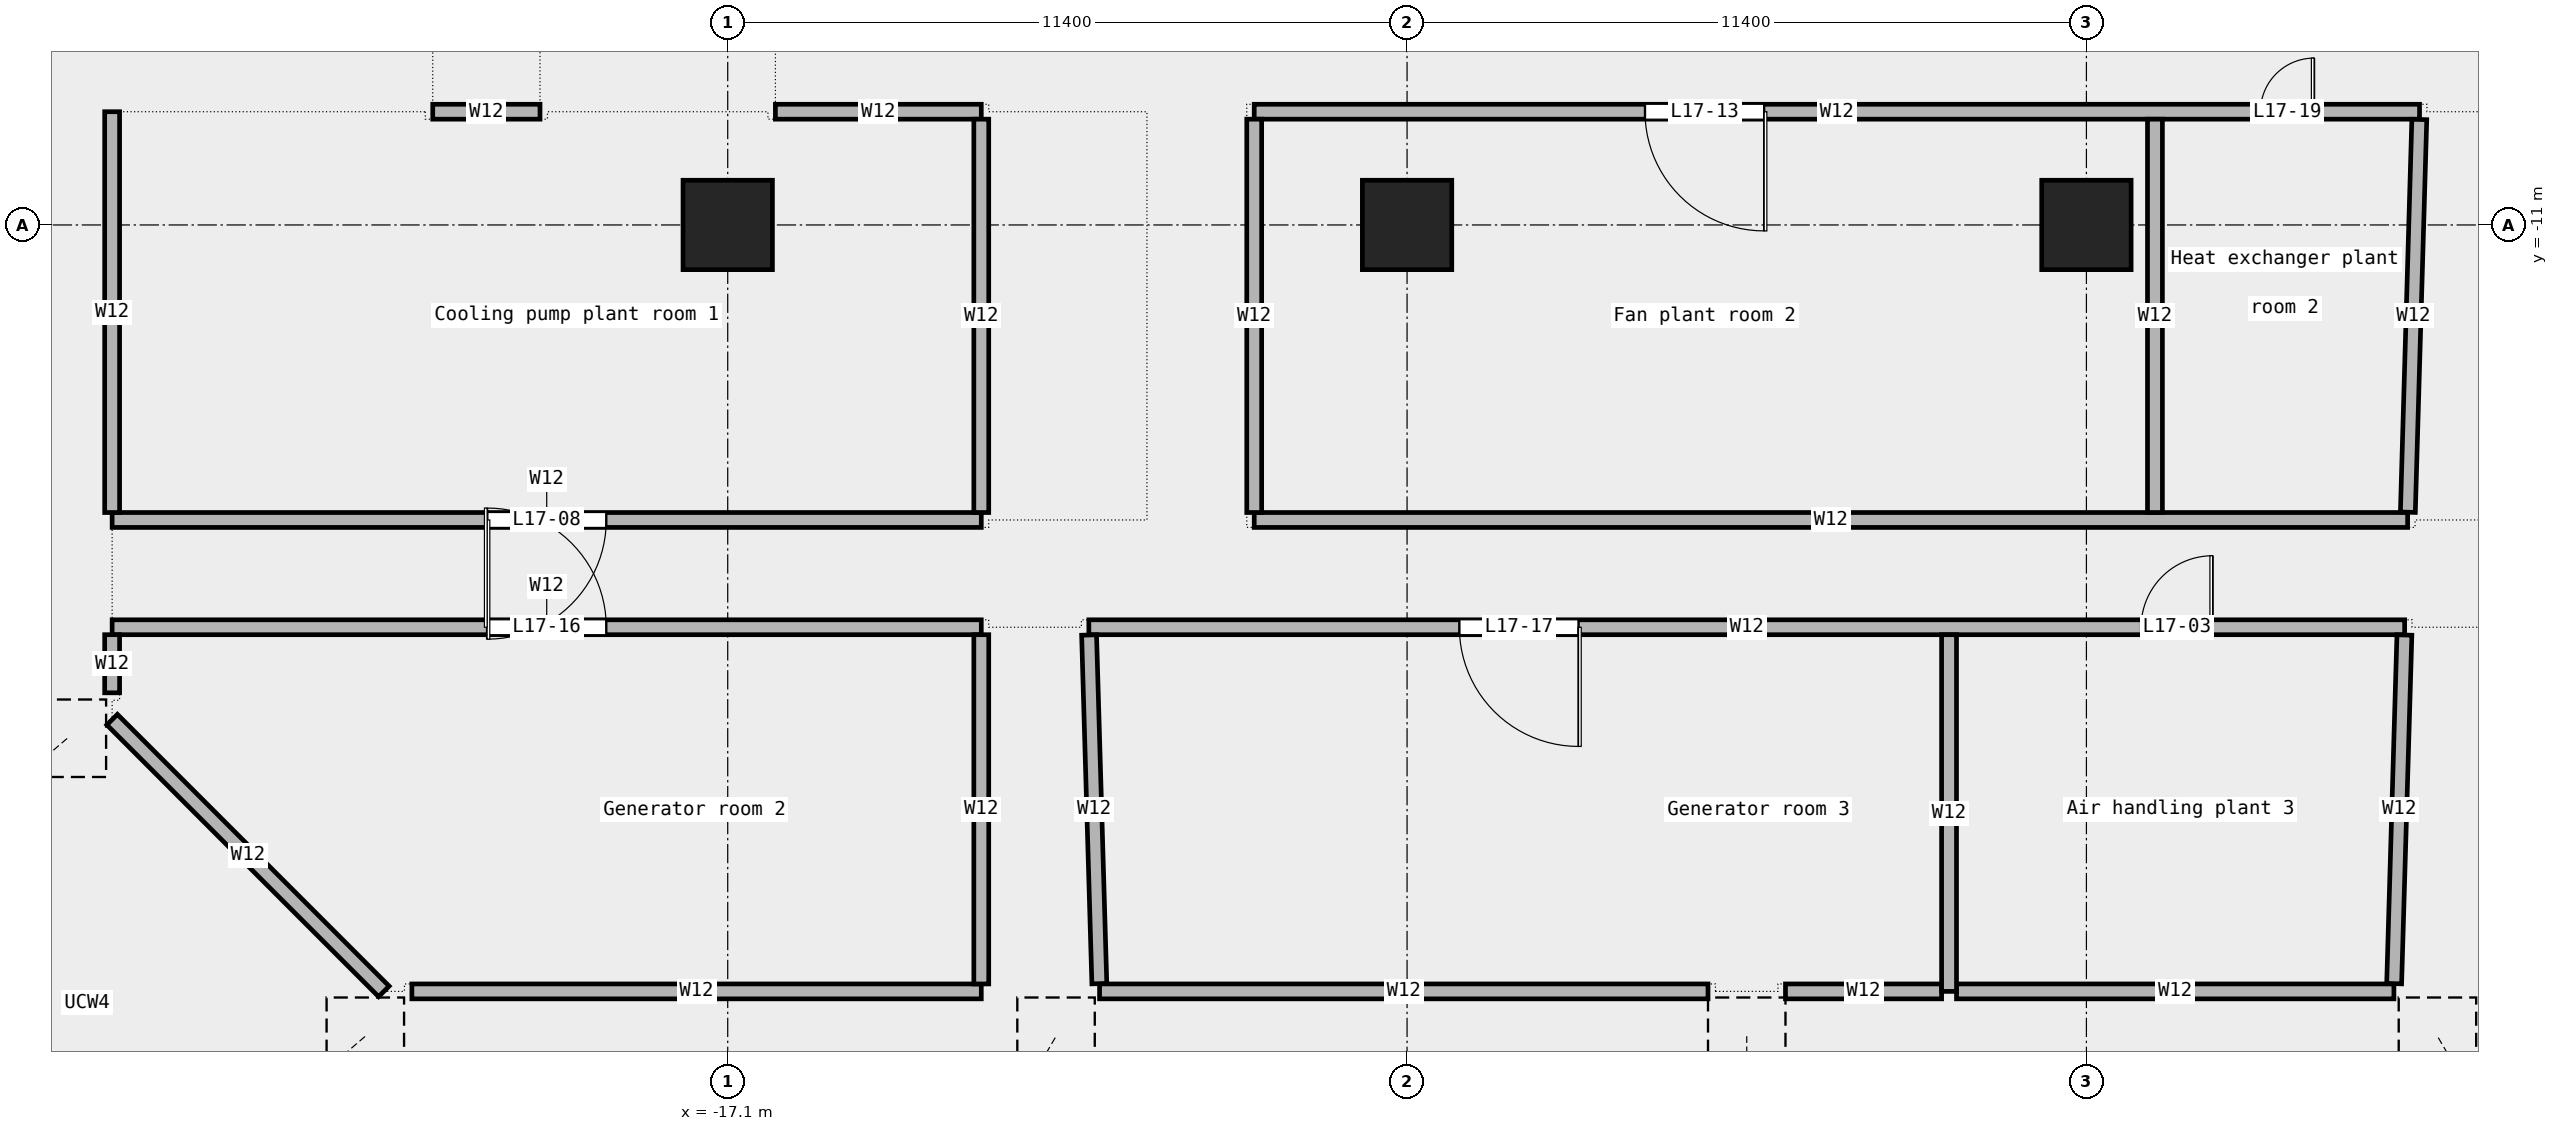
"""IFC4 building model, lengths in metres.
Left out: names, types, materials, properties, quantities, classifications, styles, units other than length and angle.
Written with IfcOpenShell. Run it as: python <this file> out.ifc"""

import sys

from ifc_helpers import new_model, si_unit, direction, frame, frame_2d, origin, origin_2d, place, context, subcontext, project, spatial, rectangle, extrude, element, fill, save


model = new_model("IFC4")
c1 = context("Model", 3, precision=1e-05, world=origin(), true_north=direction((0.0, 1.0)))
c2 = subcontext(c1, "Body", "Model", "MODEL_VIEW")
j1 = project(units=[si_unit("LENGTHUNIT", "METRE"), si_unit("PLANEANGLEUNIT", "RADIAN")], contexts=[c1])
p1 = place(None, origin())
s1 = spatial("IfcSite", under=j1, at=p1, CompositionType="ELEMENT")
p2 = place(p1, origin())
s2 = spatial("IfcBuilding", under=s1, at=p2, CompositionType="ELEMENT")
p3 = place(p2, frame((0.0, 0.0, 88.6)))
s3 = spatial("IfcBuildingStorey", under=s2, at=p3, CompositionType="ELEMENT", Elevation=88.6)
p4 = place(p3, frame((-24.8, -26.0, 0.0), z_axis=(0.272262107714, 0.233373387351, 0.933493549404), x_axis=(-0.650800804228, 0.759248518745, 0.0)))
e1 = element("IfcColumn", 1, at=p4, inside=s3, PredefinedType="COLUMN", context=c2, shape_type="SweptSolid", body=[
    extrude(rectangle(XDim=1.3, YDim=1.3, at=origin_2d()), origin(), (0.0, 0.0, 1.0), 5.945),
])
p5 = place(p3, frame((-12.4, -26.0, 0.0), z_axis=(0.140080623394, 0.240144248189, 0.960576992756), x_axis=(-0.863784413599, 0.503861575062, 0.0)))
e2 = element("IfcColumn", 2, at=p5, inside=s3, PredefinedType="COLUMN", context=c2, shape_type="SweptSolid", body=[
    extrude(rectangle(XDim=1.3, YDim=1.3, at=origin_2d()), origin(), (0.0, 0.0, 1.0), 5.778),
])
p6 = place(p3, frame((0.0, -26.0, 0.0), z_axis=(0.0, 0.242535625036, 0.970142500145), x_axis=(-1.0, 0.0, 0.0)))
e3 = element("IfcColumn", 3, at=p6, inside=s3, PredefinedType="COLUMN", context=c2, shape_type="SweptSolid", body=[
    extrude(rectangle(XDim=1.3, YDim=1.3, at=origin_2d()), origin(), (0.0, 0.0, 1.0), 5.721),
])
p7 = place(p3, frame((12.4, -26.0, 0.0), z_axis=(-0.140080623394, 0.240144248189, 0.960576992756), x_axis=(-0.863784413599, -0.503861575062, 0.0)))
e4 = element("IfcColumn", 4, at=p7, inside=s3, PredefinedType="COLUMN", context=c2, shape_type="SweptSolid", body=[
    extrude(rectangle(XDim=1.3, YDim=1.3, at=origin_2d()), origin(), (0.0, 0.0, 1.0), 5.778),
])
p8 = place(p3, frame((-29.8, -21.0, 0.0), z_axis=(0.272262107714, 0.233373387351, 0.933493549404), x_axis=(-0.650800804228, 0.759248518745, 0.0)))
e5 = element("IfcColumn", 5, at=p8, inside=s3, PredefinedType="COLUMN", context=c2, shape_type="SweptSolid", body=[
    extrude(rectangle(XDim=1.3, YDim=1.3, at=origin_2d()), origin(), (0.0, 0.0, 1.0), 5.945),
])
for number, where, z_axis, x_axis in (
    (6, (-17.1, -11.0, 0.0), (0.0, 0.0, 1.0), (1.0, 0.0, 0.0)),
    (7, (-5.7, -11.0, 0.0), (0.0, 0.0, 1.0), (1.0, 0.0, 0.0)),
    (8, (5.7, -11.0, 0.0), (0.0, 0.0, 1.0), (1.0, 0.0, 0.0)),
):
    element("IfcColumn", number, at=place(p3, frame(where, z_axis=z_axis, x_axis=x_axis)), inside=s3, PredefinedType="COLUMN", context=c2, shape_type="SweptSolid", body=[
        extrude(rectangle(XDim=1.5, YDim=1.5, at=origin_2d()), origin(), (0.0, 0.0, 1.0), 5.55),
    ])
p9 = place(p3, frame((-22.4, -23.86, 0.0), z_axis=(0.0, 0.0, 1.0), x_axis=(1.0, 0.0, 0.0)))
e9 = element("IfcWall", 9, at=p9, inside=s3, PredefinedType="PARTITIONING", context=c2, shape_type="SweptSolid", body=[
    extrude(rectangle(XDim=9.555, YDim=0.25, at=frame_2d((4.777, 0.0))), origin(), (0.0, 0.0, 1.0), 5.55),
])
p10 = place(p3, frame((-10.86, -23.86, 0.0), z_axis=(0.0, 0.0, 1.0), x_axis=(1.0, 0.0, 0.0)))
e10 = element("IfcWall", 10, at=p10, inside=s3, PredefinedType="PARTITIONING", context=c2, shape_type="SweptSolid", body=[
    extrude(rectangle(XDim=10.21, YDim=0.25, at=frame_2d((5.105, 0.0))), origin(), (0.0, 0.0, 1.0), 5.55),
])
p11 = place(p3, frame((0.65, -23.86, 0.0), z_axis=(0.0, 0.0, 1.0), x_axis=(1.0, 0.0, 0.0)))
e11 = element("IfcWall", 11, at=p11, inside=s3, PredefinedType="PARTITIONING", context=c2, shape_type="SweptSolid", body=[
    extrude(rectangle(XDim=2.62, YDim=0.25, at=frame_2d((1.31, 0.0))), origin(), (0.0, 0.0, 1.0), 5.55),
])
p12 = place(p3, frame((3.52, -23.86, 0.0), z_axis=(0.0, 0.0, 1.0), x_axis=(1.0, 0.0, 0.0)))
e12 = element("IfcWall", 12, at=p12, inside=s3, PredefinedType="PARTITIONING", context=c2, shape_type="SweptSolid", body=[
    extrude(rectangle(XDim=7.34, YDim=0.25, at=frame_2d((3.67, 0.0))), origin(), (0.0, 0.0, 1.0), 5.55),
])
p13 = place(p3, frame((-27.43, -17.75, 0.0), z_axis=(0.0, 0.0, 1.0), x_axis=(1.0, 0.0, 0.0)))
e13 = element("IfcWall", 13, at=p13, inside=s3, PredefinedType="PARTITIONING", context=c2, shape_type="SweptSolid", body=[
    extrude(rectangle(XDim=14.585, YDim=0.25, at=frame_2d((7.292, 0.0))), origin(), (0.0, 0.0, 1.0), 5.55),
])
p14 = place(p13, frame((6.292, 0.0, 0.0)))
e14 = element("IfcOpeningElement", 14, at=p14, cuts=e13, PredefinedType="OPENING", context=c2, shape_type="SweptSolid", body=[
    extrude(rectangle(XDim=2.0, YDim=2.1, at=frame_2d((1.0, 1.05))), frame((0.0, 0.137, 0.0), z_axis=(0.0, -1.0, 0.0), x_axis=(1.0, 0.0, 0.0)), (0.0, 0.0, 1.0), 0.274),
])
p15 = place(p3, frame((-11.04, -17.75, 0.0), z_axis=(0.0, 0.0, 1.0), x_axis=(1.0, 0.0, 0.0)))
e15 = element("IfcWall", 15, at=p15, inside=s3, PredefinedType="PARTITIONING", context=c2, shape_type="SweptSolid", body=[
    extrude(rectangle(XDim=22.08, YDim=0.25, at=frame_2d((11.04, 0.0))), origin(), (0.0, 0.0, 1.0), 5.55),
])
p16 = place(p15, frame((17.657, 0.0, 0.0)))
e16 = element("IfcOpeningElement", 16, at=p16, cuts=e15, PredefinedType="OPENING", context=c2, shape_type="SweptSolid", body=[
    extrude(rectangle(XDim=1.2, YDim=2.1, at=frame_2d((0.6, 1.05))), frame((0.0, 0.137, 0.0), z_axis=(0.0, -1.0, 0.0), x_axis=(1.0, 0.0, 0.0)), (0.0, 0.0, 1.0), 0.274),
])
p17 = place(p15, frame((6.218, 0.0, 0.0)))
e17 = element("IfcOpeningElement", 17, at=p17, cuts=e15, PredefinedType="OPENING", context=c2, shape_type="SweptSolid", body=[
    extrude(rectangle(XDim=2.0, YDim=2.1, at=frame_2d((1.0, 1.05))), frame((0.0, 0.137, 0.0), z_axis=(0.0, -1.0, 0.0), x_axis=(1.0, 0.0, 0.0)), (0.0, 0.0, 1.0), 0.274),
])
p18 = place(p3, frame((-27.43, -15.95, 0.0), z_axis=(0.0, 0.0, 1.0), x_axis=(1.0, 0.0, 0.0)))
e18 = element("IfcWall", 18, at=p18, inside=s3, PredefinedType="PARTITIONING", context=c2, shape_type="SweptSolid", body=[
    extrude(rectangle(XDim=14.585, YDim=0.25, at=frame_2d((7.292, 0.0))), origin(), (0.0, 0.0, 1.0), 5.55),
])
p19 = place(p18, frame((6.292, 0.0, 0.0)))
e19 = element("IfcOpeningElement", 19, at=p19, cuts=e18, PredefinedType="OPENING", context=c2, shape_type="SweptSolid", body=[
    extrude(rectangle(XDim=2.0, YDim=2.1, at=frame_2d((1.0, 1.05))), frame((0.0, 0.137, 0.0), z_axis=(0.0, -1.0, 0.0), x_axis=(1.0, 0.0, 0.0)), (0.0, 0.0, 1.0), 0.274),
])
p20 = place(p3, frame((-8.265, -15.95, 0.0), z_axis=(0.0, 0.0, 1.0), x_axis=(1.0, 0.0, 0.0)))
e20 = element("IfcWall", 20, at=p20, inside=s3, PredefinedType="PARTITIONING", context=c2, shape_type="SweptSolid", body=[
    extrude(rectangle(XDim=19.355, YDim=0.25, at=frame_2d((9.677, 0.0))), origin(), (0.0, 0.0, 1.0), 5.55),
])
p21 = place(p3, frame((-22.05, -9.1, 0.0), z_axis=(0.0, 0.0, 1.0), x_axis=(1.0, 0.0, 0.0)))
e21 = element("IfcWall", 21, at=p21, inside=s3, PredefinedType="PARTITIONING", context=c2, shape_type="SweptSolid", body=[
    extrude(rectangle(XDim=1.8, YDim=0.25, at=frame_2d((0.9, 0.0))), origin(), (0.0, 0.0, 1.0), 5.55),
])
p22 = place(p3, frame((-16.3, -9.1, 0.0), z_axis=(0.0, 0.0, 1.0), x_axis=(1.0, 0.0, 0.0)))
e22 = element("IfcWall", 22, at=p22, inside=s3, PredefinedType="PARTITIONING", context=c2, shape_type="SweptSolid", body=[
    extrude(rectangle(XDim=3.455, YDim=0.25, at=frame_2d((1.728, 0.0))), origin(), (0.0, 0.0, 1.0), 5.55),
])
p23 = place(p3, frame((-8.265, -9.1, 0.0), z_axis=(0.0, 0.0, 1.0), x_axis=(1.0, 0.0, 0.0)))
e23 = element("IfcWall", 23, at=p23, inside=s3, PredefinedType="PARTITIONING", context=c2, shape_type="SweptSolid", body=[
    extrude(rectangle(XDim=19.555, YDim=0.25, at=frame_2d((9.777, 0.0))), origin(), (0.0, 0.0, 1.0), 5.55),
])
p24 = place(p23, frame((6.558, 0.0, 0.0)))
e24 = element("IfcOpeningElement", 24, at=p24, cuts=e23, PredefinedType="OPENING", context=c2, shape_type="SweptSolid", body=[
    extrude(rectangle(XDim=2.0, YDim=2.1, at=frame_2d((1.0, 1.05))), frame((0.0, 0.137, 0.0), z_axis=(0.0, -1.0, 0.0), x_axis=(1.0, 0.0, 0.0)), (0.0, 0.0, 1.0), 0.274),
])
p25 = place(p23, frame((16.885, 0.0, 0.0)))
e25 = element("IfcOpeningElement", 25, at=p25, cuts=e23, PredefinedType="OPENING", context=c2, shape_type="SweptSolid", body=[
    extrude(rectangle(XDim=0.9, YDim=2.1, at=frame_2d((0.45, 1.05))), frame((0.0, 0.137, 0.0), z_axis=(0.0, -1.0, 0.0), x_axis=(1.0, 0.0, 0.0)), (0.0, 0.0, 1.0), 0.274),
])
p26 = place(p3, frame((-27.43, -18.85, 0.0), z_axis=(0.0, 0.0, 1.0), x_axis=(0.0, 1.0, 0.0)))
e26 = element("IfcWall", 26, at=p26, inside=s3, PredefinedType="PARTITIONING", context=c2, shape_type="SweptSolid", body=[
    extrude(rectangle(XDim=0.975, YDim=0.25, at=frame_2d((0.488, 0.0))), origin(), (0.0, 0.0, 1.0), 5.55),
])
p27 = place(p3, frame((-27.43, -15.825, 0.0), z_axis=(0.0, 0.0, 1.0), x_axis=(0.0, 1.0, 0.0)))
e27 = element("IfcWall", 27, at=p27, inside=s3, PredefinedType="PARTITIONING", context=c2, shape_type="SweptSolid", body=[
    extrude(rectangle(XDim=6.725, YDim=0.25, at=frame_2d((3.362, 0.0))), origin(), (0.0, 0.0, 1.0), 5.55),
])
p28 = place(p3, frame((-12.845, -23.735, 0.0), z_axis=(0.0, 0.0, 1.0), x_axis=(0.0, 1.0, 0.0)))
e28 = element("IfcWall", 28, at=p28, inside=s3, PredefinedType="PARTITIONING", context=c2, shape_type="SweptSolid", body=[
    extrude(rectangle(XDim=5.86, YDim=0.25, at=frame_2d((2.93, 0.0))), origin(), (0.0, 0.0, 1.0), 5.55),
])
for number, where, z_axis, x_axis in (
    (29, (-12.845, -15.825, 0.0), (0.0, 0.0, 1.0), (0.0, 1.0, 0.0)),
    (30, (-8.265, -15.825, 0.0), (0.0, 0.0, 1.0), (0.0, 1.0, 0.0)),
):
    element("IfcWall", number, at=place(p3, frame(where, z_axis=z_axis, x_axis=x_axis)), inside=s3, PredefinedType="PARTITIONING", context=c2, shape_type="SweptSolid", body=[
        extrude(rectangle(XDim=6.6, YDim=0.25, at=frame_2d((3.3, 0.0))), origin(), (0.0, 0.0, 1.0), 5.55),
    ])
p29 = place(p3, frame((3.395, -23.86, 0.0), z_axis=(0.0, 0.0, 1.0), x_axis=(0.0, 1.0, 0.0)))
e31 = element("IfcWall", 31, at=p29, inside=s3, PredefinedType="PARTITIONING", context=c2, shape_type="SweptSolid", body=[
    extrude(rectangle(XDim=5.985, YDim=0.25, at=frame_2d((2.993, 0.0))), origin(), (0.0, 0.0, 1.0), 5.55),
])
p30 = place(p3, frame((6.85, -15.825, 0.0), z_axis=(0.0, 0.0, 1.0), x_axis=(0.0, 1.0, 0.0)))
e32 = element("IfcWall", 32, at=p30, inside=s3, PredefinedType="PARTITIONING", context=c2, shape_type="SweptSolid", body=[
    extrude(rectangle(XDim=6.6, YDim=0.25, at=frame_2d((3.3, 0.0))), origin(), (0.0, 0.0, 1.0), 5.55),
])
p31 = place(p3, frame((11.036, -17.88, 0.0), z_axis=(0.0, 0.0, 1.0), x_axis=(-0.029367179648, -0.999568691366, 0.0)))
e33 = element("IfcWall", 33, at=p31, inside=s3, PredefinedType="PARTITIONING", context=c2, shape_type="SweptSolid", body=[
    extrude(rectangle(XDim=5.853, YDim=0.25, at=frame_2d((2.926, 0.0))), origin(), (0.0, 0.0, 1.0), 5.55),
])
p32 = place(p3, frame((-22.87, -23.86, 0.0), z_axis=(0.0, 0.0, 1.0), x_axis=(-0.707087851559, 0.707125710308, 0.0)))
e34 = element("IfcWall", 34, at=p32, inside=s3, PredefinedType="PARTITIONING", context=c2, shape_type="SweptSolid", body=[
    extrude(rectangle(XDim=6.449, YDim=0.25, at=frame_2d((3.224, 0.0))), origin(), (0.0, 0.0, 1.0), 5.55),
])
p33 = place(p3, frame((-10.864, -23.73, 0.0), z_axis=(0.0, 0.0, 1.0), x_axis=(-0.029367179648, 0.999568691366, 0.0)))
e35 = element("IfcWall", 35, at=p33, inside=s3, PredefinedType="PARTITIONING", context=c2, shape_type="SweptSolid", body=[
    extrude(rectangle(XDim=5.853, YDim=0.25, at=frame_2d((2.926, 0.0))), origin(), (0.0, 0.0, 1.0), 5.55),
])
p34 = place(p3, frame((11.286, -9.23, 0.0), z_axis=(0.0, 0.0, 1.0), x_axis=(-0.029106323435, -0.999576321216, 0.0)))
e36 = element("IfcWall", 36, at=p34, inside=s3, PredefinedType="PARTITIONING", context=c2, shape_type="SweptSolid", body=[
    extrude(rectangle(XDim=6.593, YDim=0.25, at=frame_2d((3.296, 0.0))), origin(), (0.0, 0.0, 1.0), 5.55),
])
p35 = place(p16, origin())
e37 = element("IfcDoor", 37, at=p35, inside=s3, OperationType="SINGLE_SWING_RIGHT", PredefinedType="DOOR", context=c2, shape_type="SweptSolid", body=[
    extrude(rectangle(XDim=1.2, YDim=2.1, at=frame_2d((0.6, 1.05))), frame((0.0, 0.025, 0.0), z_axis=(0.0, -1.0, 0.0), x_axis=(1.0, 0.0, 0.0)), (0.0, 0.0, 1.0), 0.05),
])
fill(e16, e37)
p36 = place(p19, origin())
e38 = element("IfcDoor", 38, at=p36, inside=s3, OperationType="DOUBLE_DOOR_SINGLE_SWING", PredefinedType="DOOR", context=c2, shape_type="SweptSolid", body=[
    extrude(rectangle(XDim=2.0, YDim=2.1, at=frame_2d((1.0, 1.05))), frame((0.0, 0.025, 0.0), z_axis=(0.0, -1.0, 0.0), x_axis=(1.0, 0.0, 0.0)), (0.0, 0.0, 1.0), 0.05),
])
fill(e19, e38)
p37 = place(p24, origin())
e39 = element("IfcDoor", 39, at=p37, inside=s3, OperationType="DOUBLE_DOOR_SINGLE_SWING", PredefinedType="DOOR", context=c2, shape_type="SweptSolid", body=[
    extrude(rectangle(XDim=2.0, YDim=2.1, at=frame_2d((1.0, 1.05))), frame((0.0, 0.025, 0.0), z_axis=(0.0, -1.0, 0.0), x_axis=(1.0, 0.0, 0.0)), (0.0, 0.0, 1.0), 0.05),
])
fill(e24, e39)
p38 = place(p14, origin())
e40 = element("IfcDoor", 40, at=p38, inside=s3, OperationType="DOUBLE_DOOR_SINGLE_SWING", PredefinedType="DOOR", context=c2, shape_type="SweptSolid", body=[
    extrude(rectangle(XDim=2.0, YDim=2.1, at=frame_2d((1.0, 1.05))), frame((0.0, 0.025, 0.0), z_axis=(0.0, -1.0, 0.0), x_axis=(1.0, 0.0, 0.0)), (0.0, 0.0, 1.0), 0.05),
])
fill(e14, e40)
p39 = place(p17, origin())
e41 = element("IfcDoor", 41, at=p39, inside=s3, OperationType="DOUBLE_DOOR_SINGLE_SWING", PredefinedType="DOOR", context=c2, shape_type="SweptSolid", body=[
    extrude(rectangle(XDim=2.0, YDim=2.1, at=frame_2d((1.0, 1.05))), frame((0.0, 0.025, 0.0), z_axis=(0.0, -1.0, 0.0), x_axis=(1.0, 0.0, 0.0)), (0.0, 0.0, 1.0), 0.05),
])
fill(e17, e41)
p40 = place(p25, origin())
e42 = element("IfcDoor", 42, at=p40, inside=s3, OperationType="SINGLE_SWING_RIGHT", PredefinedType="DOOR", context=c2, shape_type="SweptSolid", body=[
    extrude(rectangle(XDim=0.9, YDim=2.1, at=frame_2d((0.45, 1.05))), frame((0.0, 0.025, 0.0), z_axis=(0.0, -1.0, 0.0), x_axis=(1.0, 0.0, 0.0)), (0.0, 0.0, 1.0), 0.05),
])
fill(e25, e42)
save(model, sys.argv[1])
